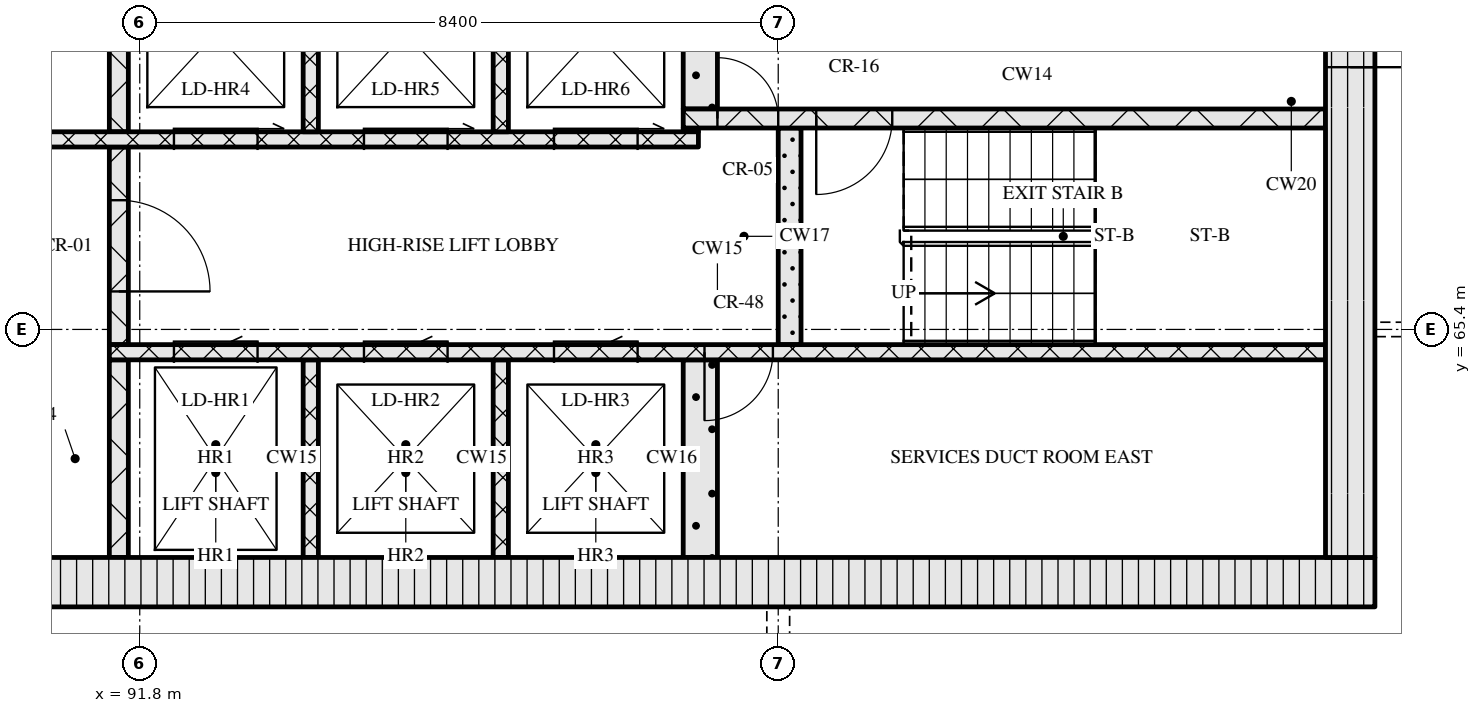
"""IFC4 building model, lengths in metres.
Left out: names, types, materials, properties, quantities, classifications, styles, units other than length and angle.
Written with IfcOpenShell. Run it as: python <this file> out.ifc"""

import sys

from ifc_helpers import new_model, si_unit, direction, frame, frame_2d, origin, place, context, subcontext, project, spatial, rectangle, extrude, element, fill, save


model = new_model("IFC4")
c1 = context("Model", 3, precision=1e-05, world=origin(), true_north=direction((0.0, 1.0)))
c2 = subcontext(c1, "Body", "Model", "MODEL_VIEW")
j1 = project(units=[si_unit("LENGTHUNIT", "METRE"), si_unit("PLANEANGLEUNIT", "RADIAN")], contexts=[c1])
p1 = place(None, origin())
s1 = spatial("IfcSite", under=j1, at=p1, CompositionType="ELEMENT")
p2 = place(p1, origin())
s2 = spatial("IfcBuilding", under=s1, at=p2, CompositionType="ELEMENT")
p3 = place(p2, frame((0.0, 0.0, 237.9)))
s3 = spatial("IfcBuildingStorey", under=s2, at=p3, CompositionType="ELEMENT", Elevation=237.9)
p4 = place(p3, frame((67.15, 62.075, 0.0), z_axis=(0.0, 0.0, 1.0), x_axis=(1.0, 0.0, 0.0)))
e1 = element("IfcWall", 1, at=p4, inside=s3, PredefinedType="SOLIDWALL", context=c2, shape_type="SweptSolid", body=[
    extrude(rectangle(XDim=40.9, YDim=0.65, at=frame_2d((20.45, 0.0))), origin(), (0.0, 0.0, 1.0), 3.32),
])
p5 = place(p4, frame((20.8, 0.0, 0.0)))
e2 = element("IfcOpeningElement", 2, at=p5, cuts=e1, PredefinedType="OPENING", context=c2, shape_type="SweptSolid", body=[
    extrude(rectangle(XDim=1.8, YDim=2.1, at=frame_2d((0.9, 1.05))), frame((0.0, 0.335, 0.0), z_axis=(0.0, -1.0, 0.0), x_axis=(1.0, 0.0, 0.0)), (0.0, 0.0, 1.0), 0.67),
])
p6 = place(p3, frame((107.725, 62.4, 0.0), z_axis=(0.0, 0.0, 1.0), x_axis=(0.0, 1.0, 0.0)))
e3 = element("IfcWall", 3, at=p6, inside=s3, PredefinedType="SOLIDWALL", context=c2, shape_type="SweptSolid", body=[
    extrude(rectangle(XDim=12.0, YDim=0.65, at=frame_2d((6.0, 0.0))), origin(), (0.0, 0.0, 1.0), 3.32),
])
p7 = place(p6, frame((6.45, 0.0, 0.0)))
e4 = element("IfcOpeningElement", 4, at=p7, cuts=e3, PredefinedType="OPENING", context=c2, shape_type="SweptSolid", body=[
    extrude(rectangle(XDim=1.2, YDim=2.1, at=frame_2d((0.6, 1.05))), frame((0.0, 0.335, 0.0), z_axis=(0.0, -1.0, 0.0), x_axis=(1.0, 0.0, 0.0)), (0.0, 0.0, 1.0), 0.67),
])
p8 = place(p3, frame((91.525, 62.4, 0.0), z_axis=(0.0, 0.0, 1.0), x_axis=(0.0, 1.0, 0.0)))
e5 = element("IfcWall", 5, at=p8, inside=s3, PredefinedType="SOLIDWALL", context=c2, shape_type="SweptSolid", body=[
    extrude(rectangle(XDim=2.6, YDim=0.25, at=frame_2d((1.3, 0.0))), origin(), (0.0, 0.0, 1.0), 3.32),
])
for number, where, z_axis, x_axis in (
    (6, (94.05, 62.4, 0.0), (0.0, 0.0, 1.0), (0.0, 1.0, 0.0)),
    (7, (96.55, 62.4, 0.0), (0.0, 0.0, 1.0), (0.0, 1.0, 0.0)),
):
    element("IfcWall", number, at=place(p3, frame(where, z_axis=z_axis, x_axis=x_axis)), inside=s3, PredefinedType="SOLIDWALL", context=c2, shape_type="SweptSolid", body=[
        extrude(rectangle(XDim=2.6, YDim=0.2, at=frame_2d((1.3, 0.0))), origin(), (0.0, 0.0, 1.0), 3.32),
    ])
p9 = place(p3, frame((99.175, 62.4, 0.0), z_axis=(0.0, 0.0, 1.0), x_axis=(0.0, 1.0, 0.0)))
e8 = element("IfcWall", 8, at=p9, inside=s3, PredefinedType="SOLIDWALL", context=c2, shape_type="SweptSolid", body=[
    extrude(rectangle(XDim=2.6, YDim=0.45, at=frame_2d((1.3, 0.0))), origin(), (0.0, 0.0, 1.0), 3.32),
])
p10 = place(p3, frame((91.4, 65.1, 0.0), z_axis=(0.0, 0.0, 1.0), x_axis=(1.0, 0.0, 0.0)))
e9 = element("IfcWall", 9, at=p10, inside=s3, PredefinedType="SOLIDWALL", context=c2, shape_type="SweptSolid", body=[
    extrude(rectangle(XDim=16.0, YDim=0.2, at=frame_2d((8.0, 0.0))), origin(), (0.0, 0.0, 1.0), 3.32),
])
p11 = place(p10, frame((0.85, 0.0, 0.0)))
e10 = element("IfcOpeningElement", 10, at=p11, cuts=e9, PredefinedType="OPENING", context=c2, shape_type="SweptSolid", body=[
    extrude(rectangle(XDim=1.1, YDim=2.1, at=frame_2d((0.55, 1.05))), frame((0.0, 0.11, 0.0), z_axis=(0.0, -1.0, 0.0), x_axis=(1.0, 0.0, 0.0)), (0.0, 0.0, 1.0), 0.22),
])
p12 = place(p10, frame((3.35, 0.0, 0.0)))
e11 = element("IfcOpeningElement", 11, at=p12, cuts=e9, PredefinedType="OPENING", context=c2, shape_type="SweptSolid", body=[
    extrude(rectangle(XDim=1.1, YDim=2.1, at=frame_2d((0.55, 1.05))), frame((0.0, 0.11, 0.0), z_axis=(0.0, -1.0, 0.0), x_axis=(1.0, 0.0, 0.0)), (0.0, 0.0, 1.0), 0.22),
])
p13 = place(p10, frame((5.85, 0.0, 0.0)))
e12 = element("IfcOpeningElement", 12, at=p13, cuts=e9, PredefinedType="OPENING", context=c2, shape_type="SweptSolid", body=[
    extrude(rectangle(XDim=1.1, YDim=2.1, at=frame_2d((0.55, 1.05))), frame((0.0, 0.11, 0.0), z_axis=(0.0, -1.0, 0.0), x_axis=(1.0, 0.0, 0.0)), (0.0, 0.0, 1.0), 0.22),
])
p14 = place(p10, frame((7.83, 0.0, 0.0)))
e13 = element("IfcOpeningElement", 13, at=p14, cuts=e9, PredefinedType="OPENING", context=c2, shape_type="SweptSolid", body=[
    extrude(rectangle(XDim=0.9, YDim=2.1, at=frame_2d((0.45, 1.05))), frame((0.0, 0.11, 0.0), z_axis=(0.0, -1.0, 0.0), x_axis=(1.0, 0.0, 0.0)), (0.0, 0.0, 1.0), 0.22),
])
p15 = place(p3, frame((91.525, 65.2, 0.0), z_axis=(0.0, 0.0, 1.0), x_axis=(0.0, 1.0, 0.0)))
e14 = element("IfcWall", 14, at=p15, inside=s3, PredefinedType="SOLIDWALL", context=c2, shape_type="SweptSolid", body=[
    extrude(rectangle(XDim=2.6, YDim=0.25, at=frame_2d((1.3, 0.0))), origin(), (0.0, 0.0, 1.0), 3.32),
])
p16 = place(p15, frame((0.7, 0.0, 0.0)))
e15 = element("IfcOpeningElement", 15, at=p16, cuts=e14, PredefinedType="OPENING", context=c2, shape_type="SweptSolid", body=[
    extrude(rectangle(XDim=1.2, YDim=2.1, at=frame_2d((0.6, 1.05))), frame((0.0, 0.135, 0.0), z_axis=(0.0, -1.0, 0.0), x_axis=(1.0, 0.0, 0.0)), (0.0, 0.0, 1.0), 0.27),
])
p17 = place(p3, frame((100.35, 65.2, 0.0), z_axis=(0.0, 0.0, 1.0), x_axis=(0.0, 1.0, 0.0)))
e16 = element("IfcWall", 16, at=p17, inside=s3, PredefinedType="SOLIDWALL", context=c2, shape_type="SweptSolid", body=[
    extrude(rectangle(XDim=2.85, YDim=0.3, at=frame_2d((1.425, 0.0))), origin(), (0.0, 0.0, 1.0), 3.32),
])
p18 = place(p3, frame((76.05, 67.9, 0.0), z_axis=(0.0, 0.0, 1.0), x_axis=(1.0, 0.0, 0.0)))
e17 = element("IfcWall", 17, at=p18, inside=s3, PredefinedType="SOLIDWALL", context=c2, shape_type="SweptSolid", body=[
    extrude(rectangle(XDim=23.1, YDim=0.2, at=frame_2d((11.55, 0.0))), origin(), (0.0, 0.0, 1.0), 3.32),
])
p19 = place(p18, frame((0.75, 0.0, 0.0)))
e18 = element("IfcOpeningElement", 18, at=p19, cuts=e17, PredefinedType="OPENING", context=c2, shape_type="SweptSolid", body=[
    extrude(rectangle(XDim=0.9, YDim=2.1, at=frame_2d((0.45, 1.05))), frame((0.0, 0.11, 0.0), z_axis=(0.0, -1.0, 0.0), x_axis=(1.0, 0.0, 0.0)), (0.0, 0.0, 1.0), 0.22),
])
p20 = place(p18, frame((3.32, 0.0, 0.0)))
e19 = element("IfcOpeningElement", 19, at=p20, cuts=e17, PredefinedType="OPENING", context=c2, shape_type="SweptSolid", body=[
    extrude(rectangle(XDim=0.9, YDim=2.1, at=frame_2d((0.45, 1.05))), frame((0.0, 0.11, 0.0), z_axis=(0.0, -1.0, 0.0), x_axis=(1.0, 0.0, 0.0)), (0.0, 0.0, 1.0), 0.22),
])
p21 = place(p18, frame((5.77, 0.0, 0.0)))
e20 = element("IfcOpeningElement", 20, at=p21, cuts=e17, PredefinedType="OPENING", context=c2, shape_type="SweptSolid", body=[
    extrude(rectangle(XDim=0.9, YDim=2.1, at=frame_2d((0.45, 1.05))), frame((0.0, 0.11, 0.0), z_axis=(0.0, -1.0, 0.0), x_axis=(1.0, 0.0, 0.0)), (0.0, 0.0, 1.0), 0.22),
])
p22 = place(p18, frame((8.45, 0.0, 0.0)))
e21 = element("IfcOpeningElement", 21, at=p22, cuts=e17, PredefinedType="OPENING", context=c2, shape_type="SweptSolid", body=[
    extrude(rectangle(XDim=0.9, YDim=2.1, at=frame_2d((0.45, 1.05))), frame((0.0, 0.11, 0.0), z_axis=(0.0, -1.0, 0.0), x_axis=(1.0, 0.0, 0.0)), (0.0, 0.0, 1.0), 0.22),
])
p23 = place(p18, frame((10.91, 0.0, 0.0)))
e22 = element("IfcOpeningElement", 22, at=p23, cuts=e17, PredefinedType="OPENING", context=c2, shape_type="SweptSolid", body=[
    extrude(rectangle(XDim=0.9, YDim=2.1, at=frame_2d((0.45, 1.05))), frame((0.0, 0.11, 0.0), z_axis=(0.0, -1.0, 0.0), x_axis=(1.0, 0.0, 0.0)), (0.0, 0.0, 1.0), 0.22),
])
p24 = place(p18, frame((13.55, 0.0, 0.0)))
e23 = element("IfcOpeningElement", 23, at=p24, cuts=e17, PredefinedType="OPENING", context=c2, shape_type="SweptSolid", body=[
    extrude(rectangle(XDim=1.0, YDim=2.1, at=frame_2d((0.5, 1.05))), frame((0.0, 0.11, 0.0), z_axis=(0.0, -1.0, 0.0), x_axis=(1.0, 0.0, 0.0)), (0.0, 0.0, 1.0), 0.22),
])
p25 = place(p18, frame((16.2, 0.0, 0.0)))
e24 = element("IfcOpeningElement", 24, at=p25, cuts=e17, PredefinedType="OPENING", context=c2, shape_type="SweptSolid", body=[
    extrude(rectangle(XDim=1.1, YDim=2.1, at=frame_2d((0.55, 1.05))), frame((0.0, 0.11, 0.0), z_axis=(0.0, -1.0, 0.0), x_axis=(1.0, 0.0, 0.0)), (0.0, 0.0, 1.0), 0.22),
])
p26 = place(p18, frame((18.7, 0.0, 0.0)))
e25 = element("IfcOpeningElement", 25, at=p26, cuts=e17, PredefinedType="OPENING", context=c2, shape_type="SweptSolid", body=[
    extrude(rectangle(XDim=1.1, YDim=2.1, at=frame_2d((0.55, 1.05))), frame((0.0, 0.11, 0.0), z_axis=(0.0, -1.0, 0.0), x_axis=(1.0, 0.0, 0.0)), (0.0, 0.0, 1.0), 0.22),
])
p27 = place(p18, frame((21.2, 0.0, 0.0)))
e26 = element("IfcOpeningElement", 26, at=p27, cuts=e17, PredefinedType="OPENING", context=c2, shape_type="SweptSolid", body=[
    extrude(rectangle(XDim=1.1, YDim=2.1, at=frame_2d((0.55, 1.05))), frame((0.0, 0.11, 0.0), z_axis=(0.0, -1.0, 0.0), x_axis=(1.0, 0.0, 0.0)), (0.0, 0.0, 1.0), 0.22),
])
p28 = place(p3, frame((91.525, 68.0, 0.0), z_axis=(0.0, 0.0, 1.0), x_axis=(0.0, 1.0, 0.0)))
e27 = element("IfcWall", 27, at=p28, inside=s3, PredefinedType="SOLIDWALL", context=c2, shape_type="SweptSolid", body=[
    extrude(rectangle(XDim=2.6, YDim=0.25, at=frame_2d((1.3, 0.0))), origin(), (0.0, 0.0, 1.0), 3.32),
])
for number, where, z_axis, x_axis in (
    (28, (94.05, 68.0, 0.0), (0.0, 0.0, 1.0), (0.0, 1.0, 0.0)),
    (29, (96.55, 68.0, 0.0), (0.0, 0.0, 1.0), (0.0, 1.0, 0.0)),
):
    element("IfcWall", number, at=place(p3, frame(where, z_axis=z_axis, x_axis=x_axis)), inside=s3, PredefinedType="SOLIDWALL", context=c2, shape_type="SweptSolid", body=[
        extrude(rectangle(XDim=2.6, YDim=0.2, at=frame_2d((1.3, 0.0))), origin(), (0.0, 0.0, 1.0), 3.32),
    ])
p29 = place(p3, frame((98.95, 68.025, 0.0), z_axis=(0.0, 0.0, 1.0), x_axis=(1.0, 0.0, 0.0)))
e30 = element("IfcWall", 30, at=p29, inside=s3, PredefinedType="SOLIDWALL", context=c2, shape_type="SweptSolid", body=[
    extrude(rectangle(XDim=0.2, YDim=0.05, at=frame_2d((0.1, 0.0))), origin(), (0.0, 0.0, 1.0), 3.32),
])
p30 = place(p3, frame((98.95, 68.175, 0.0), z_axis=(0.0, 0.0, 1.0), x_axis=(1.0, 0.0, 0.0)))
e31 = element("IfcWall", 31, at=p30, inside=s3, PredefinedType="SOLIDWALL", context=c2, shape_type="SweptSolid", body=[
    extrude(rectangle(XDim=8.45, YDim=0.25, at=frame_2d((4.225, 0.0))), origin(), (0.0, 0.0, 1.0), 3.32),
])
p31 = place(p30, frame((0.45, 0.0, 0.0)))
e32 = element("IfcOpeningElement", 32, at=p31, cuts=e31, PredefinedType="OPENING", context=c2, shape_type="SweptSolid", body=[
    extrude(rectangle(XDim=0.8, YDim=2.1, at=frame_2d((0.4, 1.05))), frame((0.0, 0.135, 0.0), z_axis=(0.0, -1.0, 0.0), x_axis=(1.0, 0.0, 0.0)), (0.0, 0.0, 1.0), 0.27),
])
p32 = place(p30, frame((1.75, 0.0, 0.0)))
e33 = element("IfcOpeningElement", 33, at=p32, cuts=e31, PredefinedType="OPENING", context=c2, shape_type="SweptSolid", body=[
    extrude(rectangle(XDim=1.0, YDim=2.1, at=frame_2d((0.5, 1.05))), frame((0.0, 0.135, 0.0), z_axis=(0.0, -1.0, 0.0), x_axis=(1.0, 0.0, 0.0)), (0.0, 0.0, 1.0), 0.27),
])
p33 = place(p3, frame((99.175, 68.3, 0.0), z_axis=(0.0, 0.0, 1.0), x_axis=(0.0, 1.0, 0.0)))
e34 = element("IfcWall", 34, at=p33, inside=s3, PredefinedType="SOLIDWALL", context=c2, shape_type="SweptSolid", body=[
    extrude(rectangle(XDim=2.3, YDim=0.45, at=frame_2d((1.15, 0.0))), origin(), (0.0, 0.0, 1.0), 3.32),
])
p34 = place(p11, origin())
e35 = element("IfcDoor", 35, at=p34, inside=s3, OperationType="SLIDING_TO_LEFT", PredefinedType="DOOR", context=c2, shape_type="SweptSolid", body=[
    extrude(rectangle(XDim=1.1, YDim=2.1, at=frame_2d((0.55, 1.05))), frame((0.0, 0.025, 0.0), z_axis=(0.0, -1.0, 0.0), x_axis=(1.0, 0.0, 0.0)), (0.0, 0.0, 1.0), 0.05),
])
fill(e10, e35)
p35 = place(p12, origin())
e36 = element("IfcDoor", 36, at=p35, inside=s3, OperationType="SLIDING_TO_LEFT", PredefinedType="DOOR", context=c2, shape_type="SweptSolid", body=[
    extrude(rectangle(XDim=1.1, YDim=2.1, at=frame_2d((0.55, 1.05))), frame((0.0, 0.025, 0.0), z_axis=(0.0, -1.0, 0.0), x_axis=(1.0, 0.0, 0.0)), (0.0, 0.0, 1.0), 0.05),
])
fill(e11, e36)
p36 = place(p13, origin())
e37 = element("IfcDoor", 37, at=p36, inside=s3, OperationType="SLIDING_TO_LEFT", PredefinedType="DOOR", context=c2, shape_type="SweptSolid", body=[
    extrude(rectangle(XDim=1.1, YDim=2.1, at=frame_2d((0.55, 1.05))), frame((0.0, 0.025, 0.0), z_axis=(0.0, -1.0, 0.0), x_axis=(1.0, 0.0, 0.0)), (0.0, 0.0, 1.0), 0.05),
])
fill(e12, e37)
p37 = place(p14, origin())
e38 = element("IfcDoor", 38, at=p37, inside=s3, OperationType="SINGLE_SWING_RIGHT", PredefinedType="DOOR", context=c2, shape_type="SweptSolid", body=[
    extrude(rectangle(XDim=0.9, YDim=2.1, at=frame_2d((0.45, 1.05))), frame((0.0, 0.025, 0.0), z_axis=(0.0, -1.0, 0.0), x_axis=(1.0, 0.0, 0.0)), (0.0, 0.0, 1.0), 0.05),
])
fill(e13, e38)
p38 = place(p16, origin())
e39 = element("IfcDoor", 39, at=p38, inside=s3, OperationType="SINGLE_SWING_RIGHT", PredefinedType="DOOR", context=c2, shape_type="SweptSolid", body=[
    extrude(rectangle(XDim=1.2, YDim=2.1, at=frame_2d((0.6, 1.05))), frame((0.0, 0.025, 0.0), z_axis=(0.0, -1.0, 0.0), x_axis=(1.0, 0.0, 0.0)), (0.0, 0.0, 1.0), 0.05),
])
fill(e15, e39)
p39 = place(p25, origin())
e40 = element("IfcDoor", 40, at=p39, inside=s3, OperationType="SLIDING_TO_RIGHT", PredefinedType="DOOR", context=c2, shape_type="SweptSolid", body=[
    extrude(rectangle(XDim=1.1, YDim=2.1, at=frame_2d((0.55, 1.05))), frame((0.0, 0.025, 0.0), z_axis=(0.0, -1.0, 0.0), x_axis=(1.0, 0.0, 0.0)), (0.0, 0.0, 1.0), 0.05),
])
fill(e24, e40)
p40 = place(p26, origin())
e41 = element("IfcDoor", 41, at=p40, inside=s3, OperationType="SLIDING_TO_RIGHT", PredefinedType="DOOR", context=c2, shape_type="SweptSolid", body=[
    extrude(rectangle(XDim=1.1, YDim=2.1, at=frame_2d((0.55, 1.05))), frame((0.0, 0.025, 0.0), z_axis=(0.0, -1.0, 0.0), x_axis=(1.0, 0.0, 0.0)), (0.0, 0.0, 1.0), 0.05),
])
fill(e25, e41)
p41 = place(p27, origin())
e42 = element("IfcDoor", 42, at=p41, inside=s3, OperationType="SLIDING_TO_RIGHT", PredefinedType="DOOR", context=c2, shape_type="SweptSolid", body=[
    extrude(rectangle(XDim=1.1, YDim=2.1, at=frame_2d((0.55, 1.05))), frame((0.0, 0.025, 0.0), z_axis=(0.0, -1.0, 0.0), x_axis=(1.0, 0.0, 0.0)), (0.0, 0.0, 1.0), 0.05),
])
fill(e26, e42)
p42 = place(p31, origin())
e43 = element("IfcDoor", 43, at=p42, inside=s3, OperationType="SINGLE_SWING_LEFT", PredefinedType="DOOR", context=c2, shape_type="SweptSolid", body=[
    extrude(rectangle(XDim=0.8, YDim=2.1, at=frame_2d((0.4, 1.05))), frame((0.0, 0.025, 0.0), z_axis=(0.0, -1.0, 0.0), x_axis=(1.0, 0.0, 0.0)), (0.0, 0.0, 1.0), 0.05),
])
fill(e32, e43)
p43 = place(p32, origin())
e44 = element("IfcDoor", 44, at=p43, inside=s3, OperationType="SINGLE_SWING_RIGHT", PredefinedType="DOOR", context=c2, shape_type="SweptSolid", body=[
    extrude(rectangle(XDim=1.0, YDim=2.1, at=frame_2d((0.5, 1.05))), frame((0.0, 0.025, 0.0), z_axis=(0.0, -1.0, 0.0), x_axis=(1.0, 0.0, 0.0)), (0.0, 0.0, 1.0), 0.05),
])
fill(e33, e44)
p44 = place(p7, origin())
e45 = element("IfcDoor", 45, at=p44, inside=s3, OperationType="SINGLE_SWING_RIGHT", PredefinedType="DOOR", context=c2, shape_type="SweptSolid", body=[
    extrude(rectangle(XDim=1.2, YDim=2.1, at=frame_2d((0.6, 1.05))), frame((0.0, 0.025, 0.0), z_axis=(0.0, -1.0, 0.0), x_axis=(1.0, 0.0, 0.0)), (0.0, 0.0, 1.0), 0.05),
])
fill(e4, e45)
save(model, sys.argv[1])
